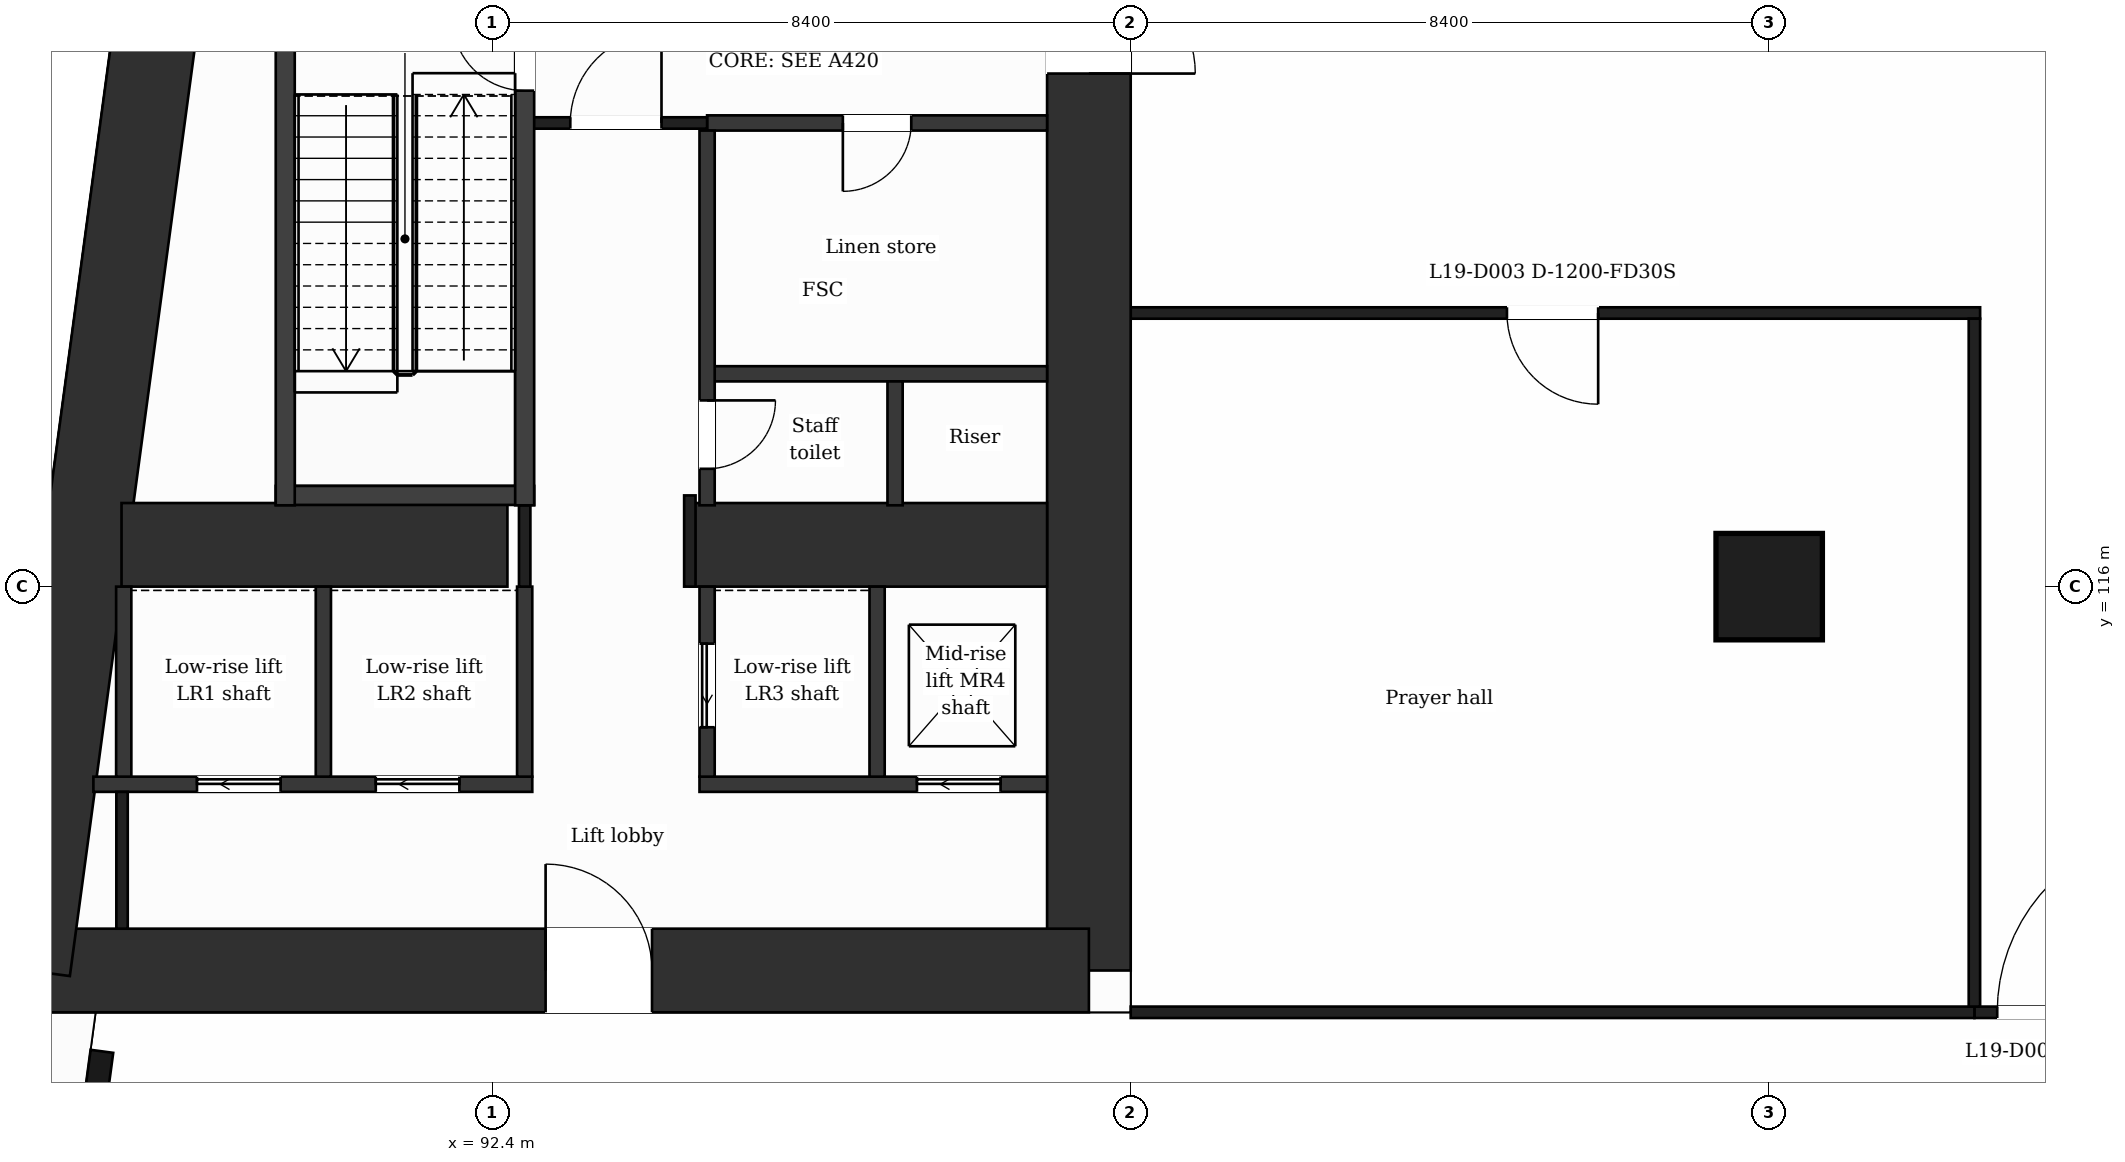
"""IFC4 building model, lengths in metres.
Left out: names, types, materials, properties, quantities, classifications, styles, units other than length and angle.
Written with IfcOpenShell. Run it as: python <this file> out.ifc"""

import sys

from ifc_helpers import new_model, si_unit, direction, frame, frame_2d, origin, origin_2d, place, context, subcontext, project, spatial, rectangle, extrude, element, fill, save


model = new_model("IFC4")
c1 = context("Model", 3, precision=1e-05, world=origin(), true_north=direction((0.0, 1.0)))
c2 = subcontext(c1, "Body", "Model", "MODEL_VIEW")
j1 = project(units=[si_unit("LENGTHUNIT", "METRE"), si_unit("PLANEANGLEUNIT", "RADIAN")], contexts=[c1])
p1 = place(None, origin())
s1 = spatial("IfcSite", under=j1, at=p1, CompositionType="ELEMENT")
p2 = place(p1, origin())
s2 = spatial("IfcBuilding", under=s1, at=p2, CompositionType="ELEMENT")
p3 = place(p2, frame((0.0, 0.0, 86.0)))
s3 = spatial("IfcBuildingStorey", under=s2, at=p3, CompositionType="ELEMENT", Elevation=86.0)
p4 = place(p3, frame((100.25, 131.85, 0.0), z_axis=(0.0, 0.0, 1.0), x_axis=(0.0, -1.0, 0.0)))
e1 = element("IfcWall", 1, at=p4, inside=s3, PredefinedType="SHEAR", context=c2, shape_type="SweptSolid", body=[
    extrude(rectangle(XDim=20.9, YDim=1.1, at=frame_2d((10.45, 0.0))), origin(), (0.0, 0.0, 1.0), 5.0),
])
p5 = place(p4, frame((7.7, 0.0, 0.0)))
e2 = element("IfcOpeningElement", 2, at=p5, cuts=e1, PredefinedType="OPENING", context=c2, shape_type="SweptSolid", body=[
    extrude(rectangle(XDim=1.4, YDim=2.1, at=frame_2d((0.7, 1.05))), frame((0.0, 0.56, 0.0), z_axis=(0.0, -1.0, 0.0), x_axis=(1.0, 0.0, 0.0)), (0.0, 0.0, 1.0), 1.12),
])
p6 = place(p3, frame((100.25, 110.95, 0.0), z_axis=(0.0, 0.0, 1.0), x_axis=(-1.0, 0.0, 0.0)))
e3 = element("IfcWall", 3, at=p6, inside=s3, PredefinedType="SHEAR", context=c2, shape_type="SweptSolid", body=[
    extrude(rectangle(XDim=13.952, YDim=1.1, at=frame_2d((6.976, 0.0))), origin(), (0.0, 0.0, 1.0), 5.0),
])
p7 = place(p6, frame((5.748, 0.0, 0.0)))
e4 = element("IfcOpeningElement", 4, at=p7, cuts=e3, PredefinedType="OPENING", context=c2, shape_type="SweptSolid", body=[
    extrude(rectangle(XDim=1.4, YDim=2.1, at=frame_2d((0.7, 1.05))), frame((0.0, 0.56, 0.0), z_axis=(0.0, -1.0, 0.0), x_axis=(1.0, 0.0, 0.0)), (0.0, 0.0, 1.0), 1.12),
])
p8 = place(p3, frame((86.298, 110.95, 0.0), z_axis=(0.0, 0.0, 1.0), x_axis=(0.133400422634, 0.99106222168, 0.0)))
e5 = element("IfcWall", 5, at=p8, inside=s3, PredefinedType="SHEAR", context=c2, shape_type="SweptSolid", body=[
    extrude(rectangle(XDim=21.089, YDim=1.1, at=frame_2d((10.544, 0.0))), origin(), (0.0, 0.0, 1.0), 5.0),
])
p9 = place(p3, frame((87.523, 116.55, 0.0), z_axis=(0.0, 0.0, 1.0), x_axis=(1.0, 0.0, 0.0)))
e6 = element("IfcWall", 6, at=p9, inside=s3, PredefinedType="SHEAR", context=c2, shape_type="SweptSolid", body=[
    extrude(rectangle(XDim=5.077, YDim=1.1, at=frame_2d((2.539, 0.0))), origin(), (0.0, 0.0, 1.0), 5.0),
])
p10 = place(p3, frame((95.0, 116.55, 0.0), z_axis=(0.0, 0.0, 1.0), x_axis=(1.0, 0.0, 0.0)))
e7 = element("IfcWall", 7, at=p10, inside=s3, PredefinedType="SHEAR", context=c2, shape_type="SweptSolid", body=[
    extrude(rectangle(XDim=4.7, YDim=1.1, at=frame_2d((2.35, 0.0))), origin(), (0.0, 0.0, 1.0), 5.0),
])
p11 = place(p3, frame((109.2, 116.0, 0.0), z_axis=(0.0, 0.0, 1.0), x_axis=(1.0, 0.0, 0.0)))
e8 = element("IfcColumn", 8, at=p11, inside=s3, PredefinedType="COLUMN", context=c2, shape_type="SweptSolid", body=[
    extrude(rectangle(XDim=1.4, YDim=1.4, at=origin_2d()), origin(), (0.0, 0.0, 1.0), 5.0),
])
p12 = place(p3, frame((87.265, 109.886, 0.0), z_axis=(0.0, 0.0, 1.0), x_axis=(-0.133384342957, -0.991064385927, 0.0)))
e9 = element("IfcWall", 9, at=p12, inside=s3, PredefinedType="SOLIDWALL", context=c2, shape_type="SweptSolid", body=[
    extrude(rectangle(XDim=3.0, YDim=0.3, at=frame_2d((1.5, 0.0))), origin(), (0.0, 0.0, 1.0), 4.68),
])
p13 = place(p12, frame((0.9, 0.0, 0.0)))
e10 = element("IfcOpeningElement", 10, at=p13, cuts=e9, PredefinedType="OPENING", context=c2, shape_type="SweptSolid", body=[
    extrude(rectangle(XDim=1.2, YDim=2.4, at=frame_2d((0.6, 1.2))), frame((0.0, 0.16, 0.0), z_axis=(0.0, -1.0, 0.0), x_axis=(1.0, 0.0, 0.0)), (0.0, 0.0, 1.0), 0.32),
])
p14 = place(p3, frame((111.9, 110.4, 0.0), z_axis=(0.0, 0.0, 1.0), x_axis=(1.0, 0.0, 0.0)))
e11 = element("IfcWall", 11, at=p14, inside=s3, PredefinedType="PARTITIONING", context=c2, shape_type="SweptSolid", body=[
    extrude(rectangle(XDim=3.0, YDim=0.15, at=frame_2d((1.5, 0.0))), origin(), (0.0, 0.0, 1.0), 4.68),
])
p15 = place(p14, frame((0.3, 0.0, 0.0)))
e12 = element("IfcOpeningElement", 12, at=p15, cuts=e11, PredefinedType="OPENING", context=c2, shape_type="SweptSolid", body=[
    extrude(rectangle(XDim=2.4, YDim=2.1, at=frame_2d((1.2, 1.05))), frame((0.0, 0.085, 0.0), z_axis=(0.0, -1.0, 0.0), x_axis=(1.0, 0.0, 0.0)), (0.0, 0.0, 1.0), 0.17),
])
p16 = place(p3, frame((100.8, 110.4, 0.0), z_axis=(0.0, 0.0, 1.0), x_axis=(1.0, 0.0, 0.0)))
e13 = element("IfcWall", 13, at=p16, inside=s3, PredefinedType="PARTITIONING", context=c2, shape_type="SweptSolid", body=[
    extrude(rectangle(XDim=11.1, YDim=0.15, at=frame_2d((5.55, 0.0))), origin(), (0.0, 0.0, 1.0), 4.68),
])
p17 = place(p3, frame((87.153, 113.4, 0.0), z_axis=(0.0, 0.0, 1.0), x_axis=(1.0, 0.0, 0.0)))
e14 = element("IfcWall", 14, at=p17, inside=s3, PredefinedType="PARTITIONING", context=c2, shape_type="SweptSolid", body=[
    extrude(rectangle(XDim=5.774, YDim=0.2, at=frame_2d((2.887, 0.0))), origin(), (0.0, 0.0, 1.0), 4.68),
])
p18 = place(p17, frame((1.363, 0.0, 0.0)))
e15 = element("IfcOpeningElement", 15, at=p18, cuts=e14, PredefinedType="OPENING", context=c2, shape_type="SweptSolid", body=[
    extrude(rectangle(XDim=1.1, YDim=2.1, at=frame_2d((0.55, 1.05))), frame((0.0, 0.11, 0.0), z_axis=(0.0, -1.0, 0.0), x_axis=(1.0, 0.0, 0.0)), (0.0, 0.0, 1.0), 0.22),
])
p19 = place(p17, frame((3.715, 0.0, 0.0)))
e16 = element("IfcOpeningElement", 16, at=p19, cuts=e14, PredefinedType="OPENING", context=c2, shape_type="SweptSolid", body=[
    extrude(rectangle(XDim=1.1, YDim=2.1, at=frame_2d((0.55, 1.05))), frame((0.0, 0.11, 0.0), z_axis=(0.0, -1.0, 0.0), x_axis=(1.0, 0.0, 0.0)), (0.0, 0.0, 1.0), 0.22),
])
p20 = place(p3, frame((95.127, 113.4, 0.0), z_axis=(0.0, 0.0, 1.0), x_axis=(1.0, 0.0, 0.0)))
e17 = element("IfcWall", 17, at=p20, inside=s3, PredefinedType="PARTITIONING", context=c2, shape_type="SweptSolid", body=[
    extrude(rectangle(XDim=4.573, YDim=0.2, at=frame_2d((2.287, 0.0))), origin(), (0.0, 0.0, 1.0), 4.68),
])
p21 = place(p20, frame((2.861, 0.0, 0.0)))
e18 = element("IfcOpeningElement", 18, at=p21, cuts=e17, PredefinedType="OPENING", context=c2, shape_type="SweptSolid", body=[
    extrude(rectangle(XDim=1.1, YDim=2.1, at=frame_2d((0.55, 1.05))), frame((0.0, 0.11, 0.0), z_axis=(0.0, -1.0, 0.0), x_axis=(1.0, 0.0, 0.0)), (0.0, 0.0, 1.0), 0.22),
])
p22 = place(p3, frame((89.552, 117.2, 0.0), z_axis=(0.0, 0.0, 1.0), x_axis=(1.0, 0.0, 0.0)))
e19 = element("IfcWall", 19, at=p22, inside=s3, PredefinedType="PARTITIONING", context=c2, shape_type="SweptSolid", body=[
    extrude(rectangle(XDim=3.4, YDim=0.25, at=frame_2d((1.7, 0.0))), origin(), (0.0, 0.0, 1.0), 4.68),
])
p23 = place(p3, frame((95.227, 118.8, 0.0), z_axis=(0.0, 0.0, 1.0), x_axis=(1.0, 0.0, 0.0)))
e20 = element("IfcWall", 20, at=p23, inside=s3, PredefinedType="PARTITIONING", context=c2, shape_type="SweptSolid", body=[
    extrude(rectangle(XDim=4.473, YDim=0.2, at=frame_2d((2.236, 0.0))), origin(), (0.0, 0.0, 1.0), 4.68),
])
p24 = place(p3, frame((100.8, 119.6, 0.0), z_axis=(0.0, 0.0, 1.0), x_axis=(1.0, 0.0, 0.0)))
e21 = element("IfcWall", 21, at=p24, inside=s3, PredefinedType="PARTITIONING", context=c2, shape_type="SweptSolid", body=[
    extrude(rectangle(XDim=11.175, YDim=0.15, at=frame_2d((5.587, 0.0))), origin(), (0.0, 0.0, 1.0), 4.68),
])
p25 = place(p24, frame((4.95, 0.0, 0.0)))
e22 = element("IfcOpeningElement", 22, at=p25, cuts=e21, PredefinedType="OPENING", context=c2, shape_type="SweptSolid", body=[
    extrude(rectangle(XDim=1.2, YDim=2.1, at=frame_2d((0.6, 1.05))), frame((0.0, 0.085, 0.0), z_axis=(0.0, -1.0, 0.0), x_axis=(1.0, 0.0, 0.0)), (0.0, 0.0, 1.0), 0.17),
])
p26 = place(p3, frame((95.227, 122.1, 0.0), z_axis=(0.0, 0.0, 1.0), x_axis=(1.0, 0.0, 0.0)))
e23 = element("IfcWall", 23, at=p26, inside=s3, PredefinedType="PARTITIONING", context=c2, shape_type="SweptSolid", body=[
    extrude(rectangle(XDim=4.473, YDim=0.2, at=frame_2d((2.236, 0.0))), origin(), (0.0, 0.0, 1.0), 4.68),
])
p27 = place(p26, frame((1.786, 0.0, 0.0)))
e24 = element("IfcOpeningElement", 24, at=p27, cuts=e23, PredefinedType="OPENING", context=c2, shape_type="SweptSolid", body=[
    extrude(rectangle(XDim=0.9, YDim=2.1, at=frame_2d((0.45, 1.05))), frame((0.0, 0.11, 0.0), z_axis=(0.0, -1.0, 0.0), x_axis=(1.0, 0.0, 0.0)), (0.0, 0.0, 1.0), 0.22),
])
p28 = place(p3, frame((92.827, 122.1, 0.0), z_axis=(0.0, 0.0, 1.0), x_axis=(1.0, 0.0, 0.0)))
e25 = element("IfcWall", 25, at=p28, inside=s3, PredefinedType="PARTITIONING", context=c2, shape_type="SweptSolid", body=[
    extrude(rectangle(XDim=2.4, YDim=0.15, at=frame_2d((1.2, 0.0))), origin(), (0.0, 0.0, 1.0), 4.68),
])
p29 = place(p28, frame((0.6, 0.0, 0.0)))
e26 = element("IfcOpeningElement", 26, at=p29, cuts=e25, PredefinedType="OPENING", context=c2, shape_type="SweptSolid", body=[
    extrude(rectangle(XDim=1.2, YDim=2.1, at=frame_2d((0.6, 1.05))), frame((0.0, 0.085, 0.0), z_axis=(0.0, -1.0, 0.0), x_axis=(1.0, 0.0, 0.0)), (0.0, 0.0, 1.0), 0.17),
])
p30 = place(p3, frame((87.552, 113.5, 0.0), z_axis=(0.0, 0.0, 1.0), x_axis=(0.0, 1.0, 0.0)))
e27 = element("IfcWall", 27, at=p30, inside=s3, PredefinedType="PARTITIONING", context=c2, shape_type="SweptSolid", body=[
    extrude(rectangle(XDim=2.5, YDim=0.2, at=frame_2d((1.25, 0.0))), origin(), (0.0, 0.0, 1.0), 4.68),
])
p31 = place(p3, frame((87.53, 111.5, 0.0), z_axis=(0.0, 0.0, 1.0), x_axis=(0.0, 1.0, 0.0)))
e28 = element("IfcWall", 28, at=p31, inside=s3, PredefinedType="PARTITIONING", context=c2, shape_type="SweptSolid", body=[
    extrude(rectangle(XDim=1.8, YDim=0.15, at=frame_2d((0.9, 0.0))), origin(), (0.0, 0.0, 1.0), 4.68),
])
p32 = place(p3, frame((89.677, 117.07, 0.0), z_axis=(0.0, 0.0, 1.0), x_axis=(0.0, 1.0, 0.0)))
e29 = element("IfcWall", 29, at=p32, inside=s3, PredefinedType="PARTITIONING", context=c2, shape_type="SweptSolid", body=[
    extrude(rectangle(XDim=6.755, YDim=0.25, at=frame_2d((3.377, 0.0))), origin(), (0.0, 0.0, 1.0), 4.68),
])
for number, where, z_axis, x_axis in (
    (30, (90.178, 113.5, 0.0), (0.0, 0.0, 1.0), (0.0, 1.0, 0.0)),
    (31, (92.827, 113.5, 0.0), (0.0, 0.0, 1.0), (0.0, 1.0, 0.0)),
):
    element("IfcWall", number, at=place(p3, frame(where, z_axis=z_axis, x_axis=x_axis)), inside=s3, PredefinedType="PARTITIONING", context=c2, shape_type="SweptSolid", body=[
        extrude(rectangle(XDim=2.5, YDim=0.2, at=frame_2d((1.25, 0.0))), origin(), (0.0, 0.0, 1.0), 4.68),
    ])
p33 = place(p3, frame((92.827, 116.0, 0.0), z_axis=(0.0, 0.0, 1.0), x_axis=(0.0, 1.0, 0.0)))
e32 = element("IfcWall", 32, at=p33, inside=s3, PredefinedType="PARTITIONING", context=c2, shape_type="SweptSolid", body=[
    extrude(rectangle(XDim=1.07, YDim=0.15, at=frame_2d((0.535, 0.0))), origin(), (0.0, 0.0, 1.0), 4.68),
])
p34 = place(p3, frame((92.827, 117.07, 0.0), z_axis=(0.0, 0.0, 1.0), x_axis=(0.0, 1.0, 0.0)))
e33 = element("IfcWall", 33, at=p34, inside=s3, PredefinedType="PARTITIONING", context=c2, shape_type="SweptSolid", body=[
    extrude(rectangle(XDim=6.755, YDim=0.25, at=frame_2d((3.377, 0.0))), origin(), (0.0, 0.0, 1.0), 4.68),
])
p35 = place(p34, frame((5.455, 0.0, 0.0)))
e34 = element("IfcOpeningElement", 34, at=p35, cuts=e33, PredefinedType="OPENING", context=c2, shape_type="SweptSolid", body=[
    extrude(rectangle(XDim=0.95, YDim=2.1, at=frame_2d((0.475, 1.05))), frame((0.0, 0.135, 0.0), z_axis=(0.0, -1.0, 0.0), x_axis=(1.0, 0.0, 0.0)), (0.0, 0.0, 1.0), 0.27),
])
p36 = place(p3, frame((95.0, 116.0, 0.0), z_axis=(0.0, 0.0, 1.0), x_axis=(0.0, 1.0, 0.0)))
e35 = element("IfcWall", 35, at=p36, inside=s3, PredefinedType="PARTITIONING", context=c2, shape_type="SweptSolid", body=[
    extrude(rectangle(XDim=1.2, YDim=0.15, at=frame_2d((0.6, 0.0))), origin(), (0.0, 0.0, 1.0), 4.68),
])
p37 = place(p3, frame((95.227, 113.5, 0.0), z_axis=(0.0, 0.0, 1.0), x_axis=(0.0, 1.0, 0.0)))
e36 = element("IfcWall", 36, at=p37, inside=s3, PredefinedType="PARTITIONING", context=c2, shape_type="SweptSolid", body=[
    extrude(rectangle(XDim=2.5, YDim=0.2, at=frame_2d((1.25, 0.0))), origin(), (0.0, 0.0, 1.0), 4.68),
])
p38 = place(p37, frame((0.65, 0.0, 0.0)))
e37 = element("IfcOpeningElement", 37, at=p38, cuts=e36, PredefinedType="OPENING", context=c2, shape_type="SweptSolid", body=[
    extrude(rectangle(XDim=1.1, YDim=2.1, at=frame_2d((0.55, 1.05))), frame((0.0, 0.11, 0.0), z_axis=(0.0, -1.0, 0.0), x_axis=(1.0, 0.0, 0.0)), (0.0, 0.0, 1.0), 0.22),
])
p39 = place(p3, frame((95.227, 117.07, 0.0), z_axis=(0.0, 0.0, 1.0), x_axis=(0.0, 1.0, 0.0)))
e38 = element("IfcWall", 38, at=p39, inside=s3, PredefinedType="PARTITIONING", context=c2, shape_type="SweptSolid", body=[
    extrude(rectangle(XDim=4.93, YDim=0.2, at=frame_2d((2.465, 0.0))), origin(), (0.0, 0.0, 1.0), 4.68),
])
p40 = place(p39, frame((0.48, 0.0, 0.0)))
e39 = element("IfcOpeningElement", 39, at=p40, cuts=e38, PredefinedType="OPENING", context=c2, shape_type="SweptSolid", body=[
    extrude(rectangle(XDim=0.9, YDim=2.1, at=frame_2d((0.45, 1.05))), frame((0.0, 0.11, 0.0), z_axis=(0.0, -1.0, 0.0), x_axis=(1.0, 0.0, 0.0)), (0.0, 0.0, 1.0), 0.22),
])
p41 = place(p3, frame((97.463, 113.5, 0.0), z_axis=(0.0, 0.0, 1.0), x_axis=(0.0, 1.0, 0.0)))
e40 = element("IfcWall", 40, at=p41, inside=s3, PredefinedType="PARTITIONING", context=c2, shape_type="SweptSolid", body=[
    extrude(rectangle(XDim=2.5, YDim=0.2, at=frame_2d((1.25, 0.0))), origin(), (0.0, 0.0, 1.0), 4.68),
])
p42 = place(p3, frame((97.7, 117.07, 0.0), z_axis=(0.0, 0.0, 1.0), x_axis=(0.0, 1.0, 0.0)))
e41 = element("IfcWall", 41, at=p42, inside=s3, PredefinedType="PARTITIONING", context=c2, shape_type="SweptSolid", body=[
    extrude(rectangle(XDim=1.63, YDim=0.2, at=frame_2d((0.815, 0.0))), origin(), (0.0, 0.0, 1.0), 4.68),
])
p43 = place(p3, frame((111.9, 110.475, 0.0), z_axis=(0.0, 0.0, 1.0), x_axis=(0.0, 1.0, 0.0)))
e42 = element("IfcWall", 42, at=p43, inside=s3, PredefinedType="PARTITIONING", context=c2, shape_type="SweptSolid", body=[
    extrude(rectangle(XDim=9.05, YDim=0.15, at=frame_2d((4.525, 0.0))), origin(), (0.0, 0.0, 1.0), 4.68),
])
p44 = place(p15, origin())
e43 = element("IfcDoor", 43, at=p44, inside=s3, OperationType="SINGLE_SWING_RIGHT", PredefinedType="DOOR", context=c2, shape_type="SweptSolid", body=[
    extrude(rectangle(XDim=2.4, YDim=2.1, at=frame_2d((1.2, 1.05))), frame((0.0, 0.025, 0.0), z_axis=(0.0, -1.0, 0.0), x_axis=(1.0, 0.0, 0.0)), (0.0, 0.0, 1.0), 0.05),
])
fill(e12, e43)
p45 = place(p25, origin())
e44 = element("IfcDoor", 44, at=p45, inside=s3, OperationType="SINGLE_SWING_RIGHT", PredefinedType="DOOR", context=c2, shape_type="SweptSolid", body=[
    extrude(rectangle(XDim=1.2, YDim=2.1, at=frame_2d((0.6, 1.05))), frame((0.0, 0.025, 0.0), z_axis=(0.0, -1.0, 0.0), x_axis=(1.0, 0.0, 0.0)), (0.0, 0.0, 1.0), 0.05),
])
fill(e22, e44)
p46 = place(p29, origin())
e45 = element("IfcDoor", 45, at=p46, inside=s3, OperationType="SINGLE_SWING_RIGHT", PredefinedType="DOOR", context=c2, shape_type="SweptSolid", body=[
    extrude(rectangle(XDim=1.2, YDim=2.1, at=frame_2d((0.6, 1.05))), frame((0.0, 0.025, 0.0), z_axis=(0.0, -1.0, 0.0), x_axis=(1.0, 0.0, 0.0)), (0.0, 0.0, 1.0), 0.05),
])
fill(e26, e45)
p47 = place(p27, origin())
e46 = element("IfcDoor", 46, at=p47, inside=s3, OperationType="SINGLE_SWING_LEFT", PredefinedType="DOOR", context=c2, shape_type="SweptSolid", body=[
    extrude(rectangle(XDim=0.9, YDim=2.1, at=frame_2d((0.45, 1.05))), frame((0.0, 0.025, 0.0), z_axis=(0.0, -1.0, 0.0), x_axis=(1.0, 0.0, 0.0)), (0.0, 0.0, 1.0), 0.05),
])
fill(e24, e46)
p48 = place(p35, origin())
e47 = element("IfcDoor", 47, at=p48, inside=s3, OperationType="SINGLE_SWING_RIGHT", PredefinedType="DOOR", context=c2, shape_type="SweptSolid", body=[
    extrude(rectangle(XDim=0.95, YDim=2.1, at=frame_2d((0.475, 1.05))), frame((0.0, 0.025, 0.0), z_axis=(0.0, -1.0, 0.0), x_axis=(1.0, 0.0, 0.0)), (0.0, 0.0, 1.0), 0.05),
])
fill(e34, e47)
p49 = place(p40, origin())
e48 = element("IfcDoor", 48, at=p49, inside=s3, OperationType="SINGLE_SWING_RIGHT", PredefinedType="DOOR", context=c2, shape_type="SweptSolid", body=[
    extrude(rectangle(XDim=0.9, YDim=2.1, at=frame_2d((0.45, 1.05))), frame((0.0, 0.025, 0.0), z_axis=(0.0, -1.0, 0.0), x_axis=(1.0, 0.0, 0.0)), (0.0, 0.0, 1.0), 0.05),
])
fill(e39, e48)
p50 = place(p18, origin())
e49 = element("IfcDoor", 49, at=p50, inside=s3, OperationType="SLIDING_TO_LEFT", PredefinedType="DOOR", context=c2, shape_type="SweptSolid", body=[
    extrude(rectangle(XDim=1.1, YDim=2.1, at=frame_2d((0.55, 1.05))), frame((0.0, 0.025, 0.0), z_axis=(0.0, -1.0, 0.0), x_axis=(1.0, 0.0, 0.0)), (0.0, 0.0, 1.0), 0.05),
])
fill(e15, e49)
p51 = place(p19, origin())
e50 = element("IfcDoor", 50, at=p51, inside=s3, OperationType="SLIDING_TO_LEFT", PredefinedType="DOOR", context=c2, shape_type="SweptSolid", body=[
    extrude(rectangle(XDim=1.1, YDim=2.1, at=frame_2d((0.55, 1.05))), frame((0.0, 0.025, 0.0), z_axis=(0.0, -1.0, 0.0), x_axis=(1.0, 0.0, 0.0)), (0.0, 0.0, 1.0), 0.05),
])
fill(e16, e50)
p52 = place(p38, origin())
e51 = element("IfcDoor", 51, at=p52, inside=s3, OperationType="SLIDING_TO_LEFT", PredefinedType="DOOR", context=c2, shape_type="SweptSolid", body=[
    extrude(rectangle(XDim=1.1, YDim=2.1, at=frame_2d((0.55, 1.05))), frame((0.0, 0.025, 0.0), z_axis=(0.0, -1.0, 0.0), x_axis=(1.0, 0.0, 0.0)), (0.0, 0.0, 1.0), 0.05),
])
fill(e37, e51)
p53 = place(p21, origin())
e52 = element("IfcDoor", 52, at=p53, inside=s3, OperationType="SLIDING_TO_LEFT", PredefinedType="DOOR", context=c2, shape_type="SweptSolid", body=[
    extrude(rectangle(XDim=1.1, YDim=2.1, at=frame_2d((0.55, 1.05))), frame((0.0, 0.025, 0.0), z_axis=(0.0, -1.0, 0.0), x_axis=(1.0, 0.0, 0.0)), (0.0, 0.0, 1.0), 0.05),
])
fill(e18, e52)
p54 = place(p7, origin())
e53 = element("IfcDoor", 53, at=p54, inside=s3, OperationType="SINGLE_SWING_RIGHT", PredefinedType="DOOR", context=c2, shape_type="SweptSolid", body=[
    extrude(rectangle(XDim=1.4, YDim=2.1, at=frame_2d((0.7, 1.05))), frame((0.0, 0.025, 0.0), z_axis=(0.0, -1.0, 0.0), x_axis=(1.0, 0.0, 0.0)), (0.0, 0.0, 1.0), 0.05),
])
fill(e4, e53)
p55 = place(p5, origin())
e54 = element("IfcDoor", 54, at=p55, inside=s3, OperationType="SINGLE_SWING_RIGHT", PredefinedType="DOOR", context=c2, shape_type="SweptSolid", body=[
    extrude(rectangle(XDim=1.4, YDim=2.1, at=frame_2d((0.7, 1.05))), frame((0.0, 0.025, 0.0), z_axis=(0.0, -1.0, 0.0), x_axis=(1.0, 0.0, 0.0)), (0.0, 0.0, 1.0), 0.05),
])
fill(e2, e54)
save(model, sys.argv[1])
